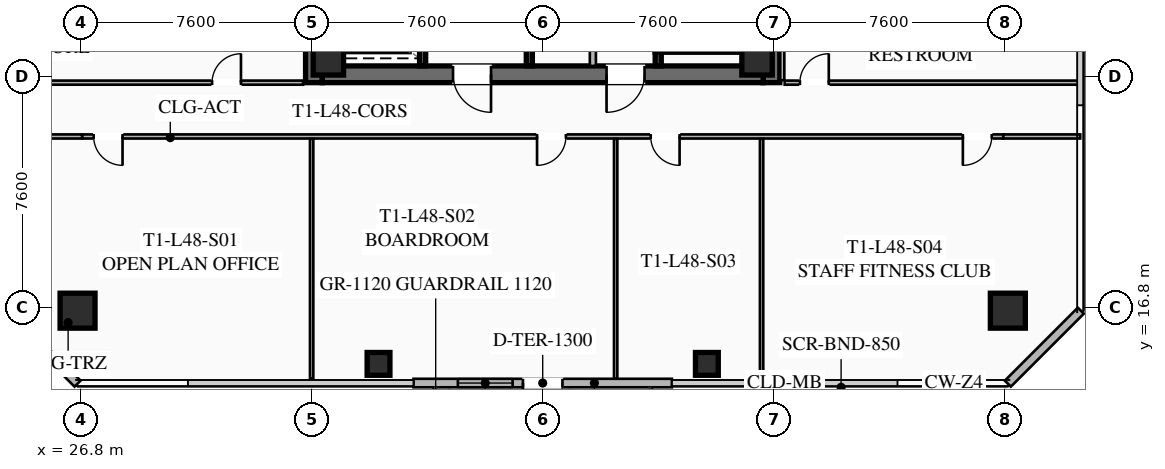
"""IFC4 building model, lengths in metres.
Left out: names, types, materials, properties, quantities, classifications, styles, units other than length and angle.
Written with IfcOpenShell. Run it as: python <this file> out.ifc"""

import sys

from ifc_helpers import new_model, si_unit, direction, frame, frame_2d, origin, origin_2d, place, context, subcontext, project, spatial, rectangle, hollow_rectangle, extrude, element, fill, save


model = new_model("IFC4")
c1 = context("Model", 3, precision=1e-05, world=origin(), true_north=direction((0.0, 1.0)))
c2 = subcontext(c1, "Body", "Model", "MODEL_VIEW")
j1 = project(units=[si_unit("LENGTHUNIT", "METRE"), si_unit("PLANEANGLEUNIT", "RADIAN")], contexts=[c1])
p1 = place(None, origin())
s1 = spatial("IfcSite", under=j1, at=p1, CompositionType="ELEMENT")
p2 = place(p1, origin())
s2 = spatial("IfcBuilding", under=s1, at=p2, CompositionType="ELEMENT")
p3 = place(p2, frame((0.0, 0.0, 178.3)))
s3 = spatial("IfcBuildingStorey", under=s2, at=p3, CompositionType="ELEMENT", Elevation=178.3)
for number, where, z_axis, x_axis in (
    (1, (34.475, 24.2, 0.0), (0.0, 0.0, 1.0), (0.0, 1.0, 0.0)),
    (2, (49.525, 39.8, 0.0), (0.0, 0.0, 1.0), (0.0, -1.0, 0.0)),
):
    element("IfcWall", number, at=place(p3, frame(where, z_axis=z_axis, x_axis=x_axis)), inside=s3, PredefinedType="SHEAR", context=c2, shape_type="SweptSolid", body=[
        extrude(rectangle(XDim=15.6, YDim=0.55, at=frame_2d((7.8, 0.0))), origin(), (0.0, 0.0, 1.0), 3.55),
    ])
p4 = place(p3, frame((49.25, 24.475, 0.0), z_axis=(0.0, 0.0, 1.0), x_axis=(-1.0, 0.0, 0.0)))
e3 = element("IfcWall", 3, at=p4, inside=s3, PredefinedType="SHEAR", context=c2, shape_type="SweptSolid", body=[
    extrude(rectangle(XDim=14.5, YDim=0.55, at=frame_2d((7.25, 0.0))), origin(), (0.0, 0.0, 1.0), 3.55),
])
p5 = place(p4, frame((8.95, 0.0, 0.0)))
e4 = element("IfcOpeningElement", 4, at=p5, cuts=e3, PredefinedType="OPENING", context=c2, shape_type="SweptSolid", body=[
    extrude(rectangle(XDim=1.25, YDim=2.25, at=frame_2d((0.625, 1.125))), frame((0.0, 0.285, 0.0), z_axis=(0.0, -1.0, 0.0), x_axis=(1.0, 0.0, 0.0)), (0.0, 0.0, 1.0), 0.57),
])
p6 = place(p4, frame((3.9, 0.0, 0.0)))
e5 = element("IfcOpeningElement", 5, at=p6, cuts=e3, PredefinedType="OPENING", context=c2, shape_type="SweptSolid", body=[
    extrude(rectangle(XDim=1.25, YDim=2.25, at=frame_2d((0.625, 1.125))), frame((0.0, 0.285, 0.0), z_axis=(0.0, -1.0, 0.0), x_axis=(1.0, 0.0, 0.0)), (0.0, 0.0, 1.0), 0.57),
])
for number, where, z_axis, x_axis in (
    (6, (34.95, 24.95, 0.0), (0.0, 0.0, 1.0), (1.0, 0.0, 0.0)),
    (7, (49.05, 24.95, 0.0), (0.0, 0.0, 1.0), (1.0, 0.0, 0.0)),
):
    element("IfcColumn", number, at=place(p3, frame(where, z_axis=z_axis, x_axis=x_axis)), inside=s3, PredefinedType="COLUMN", context=c2, shape_type="SweptSolid", body=[
        extrude(hollow_rectangle(XDim=1.0, YDim=1.0, WallThickness=0.04, at=origin_2d()), origin(), (0.0, 0.0, 1.0), 3.37),
    ])
for number, where, z_axis, x_axis in (
    (8, (26.7, 16.7, 0.0), (0.0, 0.0, 1.0), (1.0, 0.0, 0.0)),
    (9, (57.3, 16.7, 0.0), (0.0, 0.0, 1.0), (1.0, 0.0, 0.0)),
):
    element("IfcColumn", number, at=place(p3, frame(where, z_axis=z_axis, x_axis=x_axis)), inside=s3, PredefinedType="COLUMN", context=c2, shape_type="SweptSolid", body=[
        extrude(hollow_rectangle(XDim=1.15, YDim=1.15, WallThickness=0.045, at=origin_2d()), origin(), (0.0, 0.0, 1.0), 3.37),
    ])
for number, where, z_axis, x_axis in (
    (10, (36.6, 14.95, 0.0), (0.0, 0.0, 1.0), (1.0, 0.0, 0.0)),
    (11, (47.4, 14.95, 0.0), (0.0, 0.0, 1.0), (1.0, 0.0, 0.0)),
):
    element("IfcColumn", number, at=place(p3, frame(where, z_axis=z_axis, x_axis=x_axis)), inside=s3, PredefinedType="COLUMN", context=c2, shape_type="SweptSolid", body=[
        extrude(hollow_rectangle(XDim=0.75, YDim=0.75, WallThickness=0.032, at=origin_2d()), origin(), (0.0, 0.0, 1.0), 3.37),
    ])
p7 = place(p3, frame((46.25, 14.32, 0.0), z_axis=(0.0, 0.0, 1.0), x_axis=(-1.0, 0.0, 0.0)))
e12 = element("IfcWall", 12, at=p7, inside=s3, PredefinedType="SOLIDWALL", context=c2, shape_type="SweptSolid", body=[
    extrude(rectangle(XDim=8.5, YDim=0.28, at=frame_2d((4.25, 0.0))), origin(), (0.0, 0.0, 1.0), 3.37),
])
p8 = place(p7, frame((3.6, 0.0, 0.0)))
e13 = element("IfcOpeningElement", 13, at=p8, cuts=e12, PredefinedType="OPENING", context=c2, shape_type="SweptSolid", body=[
    extrude(rectangle(XDim=1.3, YDim=2.15, at=frame_2d((0.65, 1.075))), frame((0.0, 0.15, 0.0), z_axis=(0.0, -1.0, 0.0), x_axis=(1.0, 0.0, 0.0)), (0.0, 0.0, 1.0), 0.3),
])
p9 = place(p7, frame((5.24, 0.0, 0.85)))
e14 = element("IfcOpeningElement", 14, at=p9, cuts=e12, PredefinedType="OPENING", context=c2, shape_type="SweptSolid", body=[
    extrude(rectangle(XDim=1.8, YDim=1.92, at=frame_2d((0.9, 0.96))), frame((0.0, 0.15, 0.0), z_axis=(0.0, -1.0, 0.0), x_axis=(1.0, 0.0, 0.0)), (0.0, 0.0, 1.0), 0.3),
])
for number, where, z_axis, x_axis in (
    (15, (26.7, 14.3, 0.0), (0.0, 0.0, 1.0), (-0.707, 0.707, 0.0)),
    (16, (59.7, 16.7, 0.0), (0.0, 0.0, 1.0), (-0.707, -0.707, 0.0)),
):
    element("IfcWall", number, at=place(p3, frame(where, z_axis=z_axis, x_axis=x_axis)), inside=s3, PredefinedType="SOLIDWALL", context=c2, shape_type="SweptSolid", body=[
        extrude(rectangle(XDim=3.394, YDim=0.28, at=frame_2d((1.697, 0.0))), origin(), (0.0, 0.0, 1.0), 3.37),
    ])
p10 = place(p3, frame((45.8, 32.8, 0.0), z_axis=(0.0, 0.0, 1.0), x_axis=(0.0, -1.0, 0.0)))
e17 = element("IfcWall", 17, at=p10, inside=s3, PredefinedType="SHEAR", context=c2, shape_type="SweptSolid", body=[
    extrude(rectangle(XDim=8.05, YDim=0.2, at=frame_2d((4.025, 0.0))), origin(), (0.0, 0.0, 1.0), 3.37),
])
p11 = place(p10, frame((0.45, 0.0, 0.0)))
e18 = element("IfcOpeningElement", 18, at=p11, cuts=e17, PredefinedType="OPENING", context=c2, shape_type="SweptSolid", body=[
    extrude(rectangle(XDim=1.15, YDim=2.2, at=frame_2d((0.575, 1.1))), frame((0.0, 0.11, 0.0), z_axis=(0.0, -1.0, 0.0), x_axis=(1.0, 0.0, 0.0)), (0.0, 0.0, 1.0), 0.22),
])
p12 = place(p3, frame((41.56, 24.75, 0.0), z_axis=(0.0, 0.0, 1.0), x_axis=(0.0, 1.0, 0.0)))
e19 = element("IfcWall", 19, at=p12, inside=s3, PredefinedType="SHEAR", context=c2, shape_type="SweptSolid", body=[
    extrude(rectangle(XDim=14.5, YDim=0.2, at=frame_2d((7.25, 0.0))), origin(), (0.0, 0.0, 1.0), 3.37),
])
p13 = place(p3, frame((38.05, 24.75, 0.0), z_axis=(0.0, 0.0, 1.0), x_axis=(0.0, 1.0, 0.0)))
e20 = element("IfcWall", 20, at=p13, inside=s3, PredefinedType="SHEAR", context=c2, shape_type="SweptSolid", body=[
    extrude(rectangle(XDim=6.45, YDim=0.2, at=frame_2d((3.225, 0.0))), origin(), (0.0, 0.0, 1.0), 3.37),
])
p14 = place(p13, frame((4.875, 0.0, 0.0)))
e21 = element("IfcOpeningElement", 21, at=p14, cuts=e20, PredefinedType="OPENING", context=c2, shape_type="SweptSolid", body=[
    extrude(rectangle(XDim=1.3, YDim=2.25, at=frame_2d((0.65, 1.125))), frame((0.0, 0.11, 0.0), z_axis=(0.0, -1.0, 0.0), x_axis=(1.0, 0.0, 0.0)), (0.0, 0.0, 1.0), 0.22),
])
p15 = place(p13, frame((2.875, 0.0, 0.0)))
e22 = element("IfcOpeningElement", 22, at=p15, cuts=e20, PredefinedType="OPENING", context=c2, shape_type="SweptSolid", body=[
    extrude(rectangle(XDim=1.3, YDim=2.25, at=frame_2d((0.65, 1.125))), frame((0.0, 0.11, 0.0), z_axis=(0.0, -1.0, 0.0), x_axis=(1.0, 0.0, 0.0)), (0.0, 0.0, 1.0), 0.22),
])
p16 = place(p13, frame((0.675, 0.0, 0.0)))
e23 = element("IfcOpeningElement", 23, at=p16, cuts=e20, PredefinedType="OPENING", context=c2, shape_type="SweptSolid", body=[
    extrude(rectangle(XDim=1.3, YDim=2.25, at=frame_2d((0.65, 1.125))), frame((0.0, 0.11, 0.0), z_axis=(0.0, -1.0, 0.0), x_axis=(1.0, 0.0, 0.0)), (0.0, 0.0, 1.0), 0.22),
])
p17 = place(p3, frame((43.65, 24.75, 0.0), z_axis=(0.0, 0.0, 1.0), x_axis=(0.0, 1.0, 0.0)))
e24 = element("IfcWall", 24, at=p17, inside=s3, PredefinedType="SOLIDWALL", context=c2, shape_type="SweptSolid", body=[
    extrude(rectangle(XDim=6.9, YDim=0.2, at=frame_2d((3.45, 0.0))), origin(), (0.0, 0.0, 1.0), 2.723),
])
p18 = place(p17, frame((0.85, 0.0, 0.0)))
e25 = element("IfcOpeningElement", 25, at=p18, cuts=e24, PredefinedType="OPENING", context=c2, shape_type="SweptSolid", body=[
    extrude(rectangle(XDim=0.95, YDim=2.05, at=frame_2d((0.475, 1.025))), frame((0.0, 0.11, 0.0), z_axis=(0.0, -1.0, 0.0), x_axis=(1.0, 0.0, 0.0)), (0.0, 0.0, 1.0), 0.22),
])
p19 = place(p17, frame((4.8, 0.0, 0.0)))
e26 = element("IfcOpeningElement", 26, at=p19, cuts=e24, PredefinedType="OPENING", context=c2, shape_type="SweptSolid", body=[
    extrude(rectangle(XDim=1.05, YDim=2.2, at=frame_2d((0.525, 1.1))), frame((0.0, 0.11, 0.0), z_axis=(0.0, -1.0, 0.0), x_axis=(1.0, 0.0, 0.0)), (0.0, 0.0, 1.0), 0.22),
])
p20 = place(p3, frame((57.15, 22.43, 0.0), z_axis=(0.0, 0.0, 1.0), x_axis=(-1.0, 0.0, 0.0)))
e27 = element("IfcWall", 27, at=p20, inside=s3, PredefinedType="PARTITIONING", context=c2, shape_type="SweptSolid", body=[
    extrude(rectangle(XDim=30.3, YDim=0.135, at=frame_2d((15.15, 0.0))), origin(), (0.0, 0.0, 1.0), 2.723),
])
p21 = place(p20, frame((28.97, 0.0, 0.0)))
e28 = element("IfcOpeningElement", 28, at=p21, cuts=e27, PredefinedType="OPENING", context=c2, shape_type="SweptSolid", body=[
    extrude(rectangle(XDim=0.95, YDim=2.05, at=frame_2d((0.475, 1.025))), frame((0.0, 0.077, 0.0), z_axis=(0.0, -1.0, 0.0), x_axis=(1.0, 0.0, 0.0)), (0.0, 0.0, 1.0), 0.155),
])
p22 = place(p20, frame((14.386, 0.0, 0.0)))
e29 = element("IfcOpeningElement", 29, at=p22, cuts=e27, PredefinedType="OPENING", context=c2, shape_type="SweptSolid", body=[
    extrude(rectangle(XDim=0.95, YDim=2.05, at=frame_2d((0.475, 1.025))), frame((0.0, 0.077, 0.0), z_axis=(0.0, -1.0, 0.0), x_axis=(1.0, 0.0, 0.0)), (0.0, 0.0, 1.0), 0.155),
])
p23 = place(p20, frame((10.647, 0.0, 0.0)))
e30 = element("IfcOpeningElement", 30, at=p23, cuts=e27, PredefinedType="OPENING", context=c2, shape_type="SweptSolid", body=[
    extrude(rectangle(XDim=0.95, YDim=2.05, at=frame_2d((0.475, 1.025))), frame((0.0, 0.077, 0.0), z_axis=(0.0, -1.0, 0.0), x_axis=(1.0, 0.0, 0.0)), (0.0, 0.0, 1.0), 0.155),
])
p24 = place(p20, frame((0.38, 0.0, 0.0)))
e31 = element("IfcOpeningElement", 31, at=p24, cuts=e27, PredefinedType="OPENING", context=c2, shape_type="SweptSolid", body=[
    extrude(rectangle(XDim=0.95, YDim=2.05, at=frame_2d((0.475, 1.025))), frame((0.0, 0.077, 0.0), z_axis=(0.0, -1.0, 0.0), x_axis=(1.0, 0.0, 0.0)), (0.0, 0.0, 1.0), 0.155),
])
for number, where, z_axis, x_axis in (
    (32, (24.32, 22.43, 0.0), (0.0, 0.0, 1.0), (1.0, 0.0, 0.0)),
    (33, (57.15, 22.43, 0.0), (0.0, 0.0, 1.0), (1.0, 0.0, 0.0)),
):
    element("IfcWall", number, at=place(p3, frame(where, z_axis=z_axis, x_axis=x_axis)), inside=s3, PredefinedType="PARTITIONING", context=c2, shape_type="SweptSolid", body=[
        extrude(rectangle(XDim=2.53, YDim=0.135, at=frame_2d((1.265, 0.0))), origin(), (0.0, 0.0, 1.0), 2.723),
    ])
for number, where, z_axis, x_axis in (
    (34, (34.4, 14.47, 0.0), (0.0, 0.0, 1.0), (0.0, 1.0, 0.0)),
    (35, (44.4, 14.47, 0.0), (0.0, 0.0, 1.0), (0.0, 1.0, 0.0)),
    (36, (49.2, 14.47, 0.0), (0.0, 0.0, 1.0), (0.0, 1.0, 0.0)),
):
    element("IfcWall", number, at=place(p3, frame(where, z_axis=z_axis, x_axis=x_axis)), inside=s3, PredefinedType="PARTITIONING", context=c2, shape_type="SweptSolid", body=[
        extrude(rectangle(XDim=7.88, YDim=0.11, at=frame_2d((3.94, 0.0))), origin(), (0.0, 0.0, 1.0), 2.723),
    ])
p25 = place(p3, frame((49.88, 39.72, 0.0), z_axis=(0.0, 0.0, 1.0), x_axis=(0.0, -1.0, 0.0)))
e37 = element("IfcWall", 37, at=p25, inside=s3, PredefinedType="PARTITIONING", context=c2, shape_type="SweptSolid", body=[
    extrude(rectangle(XDim=15.44, YDim=0.135, at=frame_2d((7.72, 0.0))), origin(), (0.0, 0.0, 1.0), 2.723),
])
p26 = place(p3, frame((49.96, 24.2, 0.0), z_axis=(0.0, 0.0, 1.0), x_axis=(1.0, 0.0, 0.0)))
e38 = element("IfcWall", 38, at=p26, inside=s3, PredefinedType="PARTITIONING", context=c2, shape_type="SweptSolid", body=[
    extrude(rectangle(XDim=9.72, YDim=0.135, at=frame_2d((4.86, 0.0))), origin(), (0.0, 0.0, 1.0), 2.723),
])
p27 = place(p26, frame((0.5, 0.0, 0.0)))
e39 = element("IfcOpeningElement", 39, at=p27, cuts=e38, PredefinedType="OPENING", context=c2, shape_type="SweptSolid", body=[
    extrude(rectangle(XDim=0.95, YDim=2.05, at=frame_2d((0.475, 1.025))), frame((0.0, 0.077, 0.0), z_axis=(0.0, -1.0, 0.0), x_axis=(1.0, 0.0, 0.0)), (0.0, 0.0, 1.0), 0.155),
])
p28 = place(p3, frame((24.32, 24.2, 0.0), z_axis=(0.0, 0.0, 1.0), x_axis=(1.0, 0.0, 0.0)))
e40 = element("IfcWall", 40, at=p28, inside=s3, PredefinedType="PARTITIONING", context=c2, shape_type="SweptSolid", body=[
    extrude(rectangle(XDim=9.8, YDim=0.135, at=frame_2d((4.9, 0.0))), origin(), (0.0, 0.0, 1.0), 2.723),
])
p29 = place(p28, frame((6.805, 0.0, 0.0)))
e41 = element("IfcOpeningElement", 41, at=p29, cuts=e40, PredefinedType="OPENING", context=c2, shape_type="SweptSolid", body=[
    extrude(rectangle(XDim=0.95, YDim=2.05, at=frame_2d((0.475, 1.025))), frame((0.0, 0.077, 0.0), z_axis=(0.0, -1.0, 0.0), x_axis=(1.0, 0.0, 0.0)), (0.0, 0.0, 1.0), 0.155),
])
p30 = place(p8, origin())
e42 = element("IfcDoor", 42, at=p30, inside=s3, OperationType="SINGLE_SWING_RIGHT", PredefinedType="DOOR", context=c2, shape_type="SweptSolid", body=[
    extrude(rectangle(XDim=1.3, YDim=2.15, at=frame_2d((0.65, 1.075))), frame((0.0, 0.025, 0.0), z_axis=(0.0, -1.0, 0.0), x_axis=(1.0, 0.0, 0.0)), (0.0, 0.0, 1.0), 0.05),
])
fill(e13, e42)
p31 = place(p9, origin())
e43 = element("IfcWindow", 43, at=p31, inside=s3, PartitioningType="SINGLE_PANEL", PredefinedType="WINDOW", context=c2, shape_type="SweptSolid", body=[
    extrude(rectangle(XDim=1.8, YDim=1.92, at=frame_2d((0.9, 0.96))), frame((0.0, 0.03, 0.0), z_axis=(0.0, -1.0, 0.0), x_axis=(1.0, 0.0, 0.0)), (0.0, 0.0, 1.0), 0.06),
])
fill(e14, e43)
p32 = place(p5, origin())
e44 = element("IfcDoor", 44, at=p32, inside=s3, OperationType="SINGLE_SWING_LEFT", PredefinedType="DOOR", context=c2, shape_type="SweptSolid", body=[
    extrude(rectangle(XDim=1.25, YDim=2.25, at=frame_2d((0.625, 1.125))), frame((0.0, 0.025, 0.0), z_axis=(0.0, -1.0, 0.0), x_axis=(1.0, 0.0, 0.0)), (0.0, 0.0, 1.0), 0.05),
])
fill(e4, e44)
p33 = place(p6, origin())
e45 = element("IfcDoor", 45, at=p33, inside=s3, OperationType="SINGLE_SWING_RIGHT", PredefinedType="DOOR", context=c2, shape_type="SweptSolid", body=[
    extrude(rectangle(XDim=1.25, YDim=2.25, at=frame_2d((0.625, 1.125))), frame((0.0, 0.025, 0.0), z_axis=(0.0, -1.0, 0.0), x_axis=(1.0, 0.0, 0.0)), (0.0, 0.0, 1.0), 0.05),
])
fill(e5, e45)
p34 = place(p21, origin())
e46 = element("IfcDoor", 46, at=p34, inside=s3, OperationType="SINGLE_SWING_LEFT", PredefinedType="DOOR", context=c2, shape_type="SweptSolid", body=[
    extrude(rectangle(XDim=0.95, YDim=2.05, at=frame_2d((0.475, 1.025))), frame((0.0, 0.025, 0.0), z_axis=(0.0, -1.0, 0.0), x_axis=(1.0, 0.0, 0.0)), (0.0, 0.0, 1.0), 0.05),
])
fill(e28, e46)
p35 = place(p22, origin())
e47 = element("IfcDoor", 47, at=p35, inside=s3, OperationType="SINGLE_SWING_RIGHT", PredefinedType="DOOR", context=c2, shape_type="SweptSolid", body=[
    extrude(rectangle(XDim=0.95, YDim=2.05, at=frame_2d((0.475, 1.025))), frame((0.0, 0.025, 0.0), z_axis=(0.0, -1.0, 0.0), x_axis=(1.0, 0.0, 0.0)), (0.0, 0.0, 1.0), 0.05),
])
fill(e29, e47)
p36 = place(p23, origin())
e48 = element("IfcDoor", 48, at=p36, inside=s3, OperationType="SINGLE_SWING_LEFT", PredefinedType="DOOR", context=c2, shape_type="SweptSolid", body=[
    extrude(rectangle(XDim=0.95, YDim=2.05, at=frame_2d((0.475, 1.025))), frame((0.0, 0.025, 0.0), z_axis=(0.0, -1.0, 0.0), x_axis=(1.0, 0.0, 0.0)), (0.0, 0.0, 1.0), 0.05),
])
fill(e30, e48)
p37 = place(p24, origin())
e49 = element("IfcDoor", 49, at=p37, inside=s3, OperationType="SINGLE_SWING_RIGHT", PredefinedType="DOOR", context=c2, shape_type="SweptSolid", body=[
    extrude(rectangle(XDim=0.95, YDim=2.05, at=frame_2d((0.475, 1.025))), frame((0.0, 0.025, 0.0), z_axis=(0.0, -1.0, 0.0), x_axis=(1.0, 0.0, 0.0)), (0.0, 0.0, 1.0), 0.05),
])
fill(e31, e49)
p38 = place(p27, origin())
e50 = element("IfcDoor", 50, at=p38, inside=s3, OperationType="SINGLE_SWING_RIGHT", PredefinedType="DOOR", context=c2, shape_type="SweptSolid", body=[
    extrude(rectangle(XDim=0.95, YDim=2.05, at=frame_2d((0.475, 1.025))), frame((0.0, 0.025, 0.0), z_axis=(0.0, -1.0, 0.0), x_axis=(1.0, 0.0, 0.0)), (0.0, 0.0, 1.0), 0.05),
])
fill(e39, e50)
p39 = place(p29, origin())
e51 = element("IfcDoor", 51, at=p39, inside=s3, OperationType="SINGLE_SWING_RIGHT", PredefinedType="DOOR", context=c2, shape_type="SweptSolid", body=[
    extrude(rectangle(XDim=0.95, YDim=2.05, at=frame_2d((0.475, 1.025))), frame((0.0, 0.025, 0.0), z_axis=(0.0, -1.0, 0.0), x_axis=(1.0, 0.0, 0.0)), (0.0, 0.0, 1.0), 0.05),
])
fill(e41, e51)
save(model, sys.argv[1])
